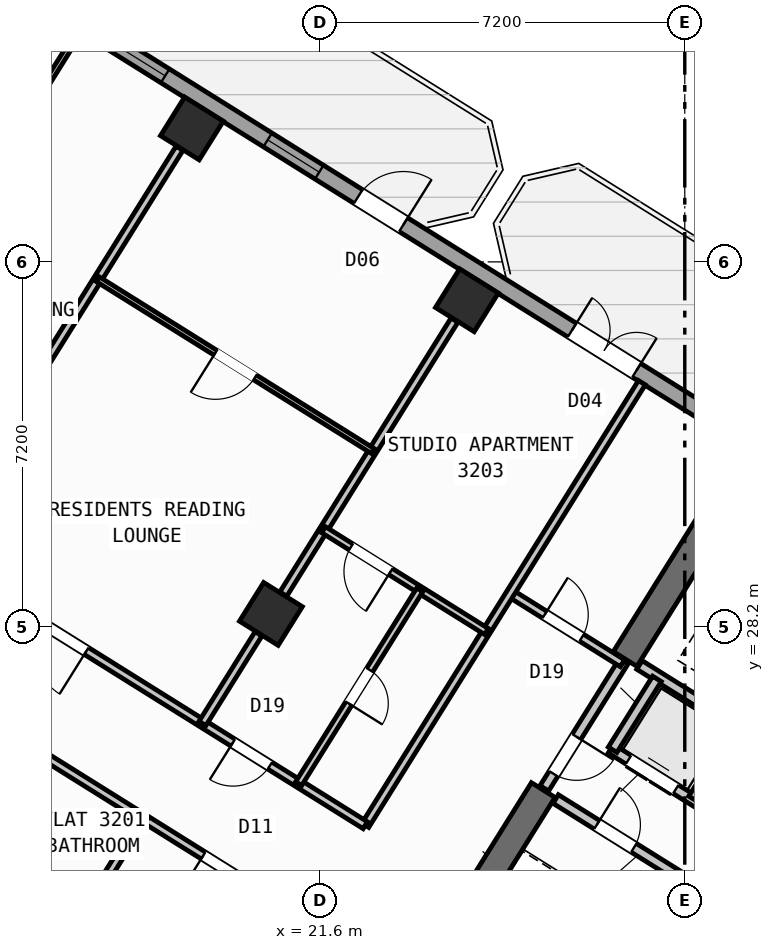
"""IFC4 building model, lengths in metres.
Left out: names, types, materials, properties, quantities, classifications, styles, units other than length and angle.
Written with IfcOpenShell. Run it as: python <this file> out.ifc"""

import sys

from ifc_helpers import new_model, si_unit, direction, frame, frame_2d, origin, origin_2d, place, context, subcontext, project, spatial, rectangle, hollow_rectangle, extrude, source, transform, mapped, element, fill, save


model = new_model("IFC4")
c1 = context("Model", 3, precision=1e-05, world=origin(), true_north=direction((0.0, 1.0)))
c2 = subcontext(c1, "Body", "Model", "MODEL_VIEW")
j1 = project(units=[si_unit("LENGTHUNIT", "METRE"), si_unit("PLANEANGLEUNIT", "RADIAN")], contexts=[c1])
p1 = place(None, origin())
s1 = spatial("IfcSite", under=j1, at=p1, CompositionType="ELEMENT")
p2 = place(p1, origin())
s2 = spatial("IfcBuilding", under=s1, at=p2, CompositionType="ELEMENT")
p3 = place(p2, frame((0.0, 0.0, 127.8)))
s3 = spatial("IfcBuildingStorey", under=s2, at=p3, CompositionType="ELEMENT", Elevation=127.8)
p4 = place(p3, frame((29.517, 30.594, 0.0), z_axis=(0.0, 0.0, 1.0), x_axis=(-0.529906864564, -0.848055844204, 0.0)))
e1 = element("IfcWall", 1, at=p4, inside=s3, PredefinedType="SHEAR", context=c2, shape_type="SweptSolid", body=[
    extrude(rectangle(XDim=3.575, YDim=0.55, at=frame_2d((1.788, 0.0))), origin(), (0.0, 0.0, 1.0), 4.55),
])
p5 = place(p3, frame((26.007, 24.976, 0.0), z_axis=(0.0, 0.0, 1.0), x_axis=(-0.529923795287, -0.848045264823, 0.0)))
e2 = element("IfcWall", 2, at=p5, inside=s3, PredefinedType="SHEAR", context=c2, shape_type="SweptSolid", body=[
    extrude(rectangle(XDim=6.425, YDim=0.55, at=frame_2d((3.212, 0.0))), origin(), (0.0, 0.0, 1.0), 4.55),
])
m1 = source(origin(), c2, "Body", "SweptSolid", [
    extrude(hollow_rectangle(XDim=0.9, YDim=0.9, WallThickness=0.036, at=origin_2d()), origin(), (0.0, 0.0, 1.0), 4.8),
])
for number, where, z_axis, x_axis in (
    (3, (24.5, 34.643, 0.0), (0.0, 0.0, 1.0), (-0.848, 0.53, 0.0)),
    (4, (20.632, 28.452, 0.0), (0.0, 0.0, 1.0), (-0.848, 0.53, 0.0)),
    (5, (19.073, 38.034, 0.0), (0.0, 0.0, 1.0), (-0.848, 0.53, 0.0)),
):
    element("IfcColumn", number, at=place(p3, frame(where, z_axis=z_axis, x_axis=x_axis)), inside=s3, PredefinedType="COLUMN", context=c2, shape_type="MappedRepresentation", body=[
        mapped(m1, transform((0.0, 0.0, 0.0), scale=1.0)),
    ])
p6 = place(p3, frame((14.138, 41.825, 0.0), z_axis=(0.0, 0.0, 1.0), x_axis=(0.848046498049, -0.529921821731, 0.0)))
e6 = element("IfcWall", 6, at=p6, inside=s3, PredefinedType="STANDARD", context=c2, shape_type="SweptSolid", body=[
    extrude(rectangle(XDim=31.588, YDim=0.32, at=frame_2d((15.794, 0.0))), origin(), (0.0, 0.0, 1.0), 4.55),
])
p7 = place(p6, frame((9.69, 0.0, 0.0)))
e7 = element("IfcOpeningElement", 7, at=p7, cuts=e6, PredefinedType="OPENING", context=c2, shape_type="SweptSolid", body=[
    extrude(rectangle(XDim=1.05, YDim=2.15, at=frame_2d((0.525, 1.075))), frame((0.0, 0.17, 0.0), z_axis=(0.0, -1.0, 0.0), x_axis=(1.0, 0.0, 0.0)), (0.0, 0.0, 1.0), 0.34),
])
p8 = place(p6, frame((14.666, 0.0, 0.0)))
e8 = element("IfcOpeningElement", 8, at=p8, cuts=e6, PredefinedType="OPENING", context=c2, shape_type="SweptSolid", body=[
    extrude(rectangle(XDim=1.5, YDim=2.25, at=frame_2d((0.75, 1.125))), frame((0.0, 0.17, 0.0), z_axis=(0.0, -1.0, 0.0), x_axis=(1.0, 0.0, 0.0)), (0.0, 0.0, 1.0), 0.34),
])
p9 = place(p6, frame((0.791, 0.0, 0.85)))
e9 = element("IfcOpeningElement", 9, at=p9, cuts=e6, PredefinedType="OPENING", context=c2, shape_type="SweptSolid", body=[
    extrude(rectangle(XDim=1.8, YDim=1.5, at=frame_2d((0.9, 0.75))), frame((0.0, 0.17, 0.0), z_axis=(0.0, -1.0, 0.0), x_axis=(1.0, 0.0, 0.0)), (0.0, 0.0, 1.0), 0.34),
])
p10 = place(p6, frame((3.996, 0.0, 0.95)))
e10 = element("IfcOpeningElement", 10, at=p10, cuts=e6, PredefinedType="OPENING", context=c2, shape_type="SweptSolid", body=[
    extrude(rectangle(XDim=1.2, YDim=1.4, at=frame_2d((0.6, 0.7))), frame((0.0, 0.17, 0.0), z_axis=(0.0, -1.0, 0.0), x_axis=(1.0, 0.0, 0.0)), (0.0, 0.0, 1.0), 0.34),
])
p11 = place(p6, frame((7.582, 0.0, 0.95)))
e11 = element("IfcOpeningElement", 11, at=p11, cuts=e6, PredefinedType="OPENING", context=c2, shape_type="SweptSolid", body=[
    extrude(rectangle(XDim=1.2, YDim=1.4, at=frame_2d((0.6, 0.7))), frame((0.0, 0.17, 0.0), z_axis=(0.0, -1.0, 0.0), x_axis=(1.0, 0.0, 0.0)), (0.0, 0.0, 1.0), 0.34),
])
p12 = place(p6, frame((21.381, 0.0, 0.75)))
e12 = element("IfcOpeningElement", 12, at=p12, cuts=e6, PredefinedType="OPENING", context=c2, shape_type="SweptSolid", body=[
    extrude(rectangle(XDim=2.4, YDim=1.6, at=frame_2d((1.2, 0.8))), frame((0.0, 0.17, 0.0), z_axis=(0.0, -1.0, 0.0), x_axis=(1.0, 0.0, 0.0)), (0.0, 0.0, 1.0), 0.34),
])
p13 = place(p6, frame((26.956, 0.0, 0.75)))
e13 = element("IfcOpeningElement", 13, at=p13, cuts=e6, PredefinedType="OPENING", context=c2, shape_type="SweptSolid", body=[
    extrude(rectangle(XDim=2.4, YDim=1.6, at=frame_2d((1.2, 0.8))), frame((0.0, 0.17, 0.0), z_axis=(0.0, -1.0, 0.0), x_axis=(1.0, 0.0, 0.0)), (0.0, 0.0, 1.0), 0.34),
])
p14 = place(p3, frame((31.822, 24.998, 0.0), z_axis=(0.0, 0.0, 1.0), x_axis=(-0.848036912365, 0.52993716162, 0.0)))
e14 = element("IfcWall", 14, at=p14, inside=s3, PredefinedType="STANDARD", context=c2, shape_type="SweptSolid", body=[
    extrude(rectangle(XDim=4.618, YDim=0.2, at=frame_2d((2.309, 0.0))), origin(), (0.0, 0.0, 1.0), 4.54),
])
p15 = place(p3, frame((32.108, 22.814, 0.0), z_axis=(0.0, 0.0, 1.0), x_axis=(-0.848042229521, 0.529928652696, 0.0)))
e15 = element("IfcWall", 15, at=p15, inside=s3, PredefinedType="STANDARD", context=c2, shape_type="SweptSolid", body=[
    extrude(rectangle(XDim=5.62, YDim=0.2, at=frame_2d((2.81, 0.0))), origin(), (0.0, 0.0, 1.0), 4.54),
])
p16 = place(p15, frame((0.39, 0.0, 0.0)))
e16 = element("IfcOpeningElement", 16, at=p16, cuts=e15, PredefinedType="OPENING", context=c2, shape_type="SweptSolid", body=[
    extrude(rectangle(XDim=1.1, YDim=2.15, at=frame_2d((0.55, 1.075))), frame((0.0, 0.11, 0.0), z_axis=(0.0, -1.0, 0.0), x_axis=(1.0, 0.0, 0.0)), (0.0, 0.0, 1.0), 0.22),
])
p17 = place(p15, frame((2.25, 0.0, 0.0)))
e17 = element("IfcOpeningElement", 17, at=p17, cuts=e15, PredefinedType="OPENING", context=c2, shape_type="SweptSolid", body=[
    extrude(rectangle(XDim=1.1, YDim=2.15, at=frame_2d((0.55, 1.075))), frame((0.0, 0.11, 0.0), z_axis=(0.0, -1.0, 0.0), x_axis=(1.0, 0.0, 0.0)), (0.0, 0.0, 1.0), 0.22),
])
p18 = place(p15, frame((4.11, 0.0, 0.0)))
e18 = element("IfcOpeningElement", 18, at=p18, cuts=e15, PredefinedType="OPENING", context=c2, shape_type="SweptSolid", body=[
    extrude(rectangle(XDim=1.1, YDim=2.15, at=frame_2d((0.55, 1.075))), frame((0.0, 0.11, 0.0), z_axis=(0.0, -1.0, 0.0), x_axis=(1.0, 0.0, 0.0)), (0.0, 0.0, 1.0), 0.22),
])
p19 = place(p3, frame((28.25, 27.17, 0.0), z_axis=(0.0, 0.0, 1.0), x_axis=(-0.529905827651, -0.848056492117, 0.0)))
e19 = element("IfcWall", 19, at=p19, inside=s3, PredefinedType="STANDARD", context=c2, shape_type="SweptSolid", body=[
    extrude(rectangle(XDim=1.65, YDim=0.2, at=frame_2d((0.825, 0.0))), origin(), (0.0, 0.0, 1.0), 4.54),
])
p20 = place(p3, frame((29.801, 26.142, 0.0), z_axis=(0.0, 0.0, 1.0), x_axis=(-0.529998940003, -0.847998304005, 0.0)))
e20 = element("IfcWall", 20, at=p20, inside=s3, PredefinedType="STANDARD", context=c2, shape_type="SweptSolid", body=[
    extrude(rectangle(XDim=1.58, YDim=0.2, at=frame_2d((0.79, 0.0))), origin(), (0.0, 0.0, 1.0), 4.54),
])
p21 = place(p3, frame((31.525, 21.504, 0.0), z_axis=(0.0, 0.0, 1.0), x_axis=(-0.848040211232, 0.529931882541, 0.0)))
e21 = element("IfcWall", 21, at=p21, inside=s3, PredefinedType="STANDARD", context=c2, shape_type="SweptSolid", body=[
    extrude(rectangle(XDim=6.218, YDim=0.2, at=frame_2d((3.109, 0.0))), origin(), (0.0, 0.0, 1.0), 4.54),
])
p22 = place(p21, frame((4.4, 0.0, 0.0)))
e22 = element("IfcOpeningElement", 22, at=p22, cuts=e21, PredefinedType="OPENING", context=c2, shape_type="SweptSolid", body=[
    extrude(rectangle(XDim=0.86, YDim=2.05, at=frame_2d((0.43, 1.025))), frame((0.0, 0.11, 0.0), z_axis=(0.0, -1.0, 0.0), x_axis=(1.0, 0.0, 0.0)), (0.0, 0.0, 1.0), 0.22),
])
p23 = place(p21, frame((1.45, 0.0, 0.0)))
e23 = element("IfcOpeningElement", 23, at=p23, cuts=e21, PredefinedType="OPENING", context=c2, shape_type="SweptSolid", body=[
    extrude(rectangle(XDim=0.86, YDim=2.05, at=frame_2d((0.43, 1.025))), frame((0.0, 0.11, 0.0), z_axis=(0.0, -1.0, 0.0), x_axis=(1.0, 0.0, 0.0)), (0.0, 0.0, 1.0), 0.22),
])
p24 = place(p3, frame((27.596, 27.52, 0.0), z_axis=(0.0, 0.0, 1.0), x_axis=(-0.529865479138, -0.848081702443, 0.0)))
e24 = element("IfcWall", 24, at=p24, inside=s3, PredefinedType="STANDARD", context=c2, shape_type="SweptSolid", body=[
    extrude(rectangle(XDim=2.96, YDim=0.2, at=frame_2d((1.48, 0.0))), origin(), (0.0, 0.0, 1.0), 4.54),
])
p25 = place(p24, frame((1.76, 0.0, 0.0)))
e25 = element("IfcOpeningElement", 25, at=p25, cuts=e24, PredefinedType="OPENING", context=c2, shape_type="SweptSolid", body=[
    extrude(rectangle(XDim=0.86, YDim=2.05, at=frame_2d((0.43, 1.025))), frame((0.0, 0.11, 0.0), z_axis=(0.0, -1.0, 0.0), x_axis=(1.0, 0.0, 0.0)), (0.0, 0.0, 1.0), 0.22),
])
p26 = place(p3, frame((27.57, 27.478, 0.0), z_axis=(0.0, 0.0, 1.0), x_axis=(-0.848050851465, 0.529914854792, 0.0)))
e26 = element("IfcWall", 26, at=p26, inside=s3, PredefinedType="PARTITIONING", context=c2, shape_type="SweptSolid", body=[
    extrude(rectangle(XDim=2.61, YDim=0.16, at=frame_2d((1.305, 0.0))), origin(), (0.0, 0.0, 1.0), 4.54),
])
p27 = place(p26, frame((0.95, 0.0, 0.0)))
e27 = element("IfcOpeningElement", 27, at=p27, cuts=e26, PredefinedType="OPENING", context=c2, shape_type="SweptSolid", body=[
    extrude(rectangle(XDim=0.86, YDim=2.05, at=frame_2d((0.43, 1.025))), frame((0.0, 0.09, 0.0), z_axis=(0.0, -1.0, 0.0), x_axis=(1.0, 0.0, 0.0)), (0.0, 0.0, 1.0), 0.18),
])
p28 = place(p3, frame((27.953, 33.016, 0.0), z_axis=(0.0, 0.0, 1.0), x_axis=(-0.529909450694, -0.848054228257, 0.0)))
e28 = element("IfcWall", 28, at=p28, inside=s3, PredefinedType="PARTITIONING", context=c2, shape_type="SweptSolid", body=[
    extrude(rectangle(XDim=10.3, YDim=0.16, at=frame_2d((5.15, 0.0))), origin(), (0.0, 0.0, 1.0), 4.54),
])
p29 = place(p3, frame((22.495, 24.281, 0.0), z_axis=(0.0, 0.0, 1.0), x_axis=(-0.848052408131, 0.529912363569, 0.0)))
e29 = element("IfcWall", 29, at=p29, inside=s3, PredefinedType="PARTITIONING", context=c2, shape_type="SweptSolid", body=[
    extrude(rectangle(XDim=16.73, YDim=0.16, at=frame_2d((8.365, 0.0))), origin(), (0.0, 0.0, 1.0), 4.54),
])
p30 = place(p29, frame((2.22, 0.0, 0.0)))
e30 = element("IfcOpeningElement", 30, at=p30, cuts=e29, PredefinedType="OPENING", context=c2, shape_type="SweptSolid", body=[
    extrude(rectangle(XDim=0.86, YDim=2.05, at=frame_2d((0.43, 1.025))), frame((0.0, 0.09, 0.0), z_axis=(0.0, -1.0, 0.0), x_axis=(1.0, 0.0, 0.0)), (0.0, 0.0, 1.0), 0.18),
])
p31 = place(p29, frame((6.49, 0.0, 0.0)))
e31 = element("IfcOpeningElement", 31, at=p31, cuts=e29, PredefinedType="OPENING", context=c2, shape_type="SweptSolid", body=[
    extrude(rectangle(XDim=1.0, YDim=2.1, at=frame_2d((0.5, 1.05))), frame((0.0, 0.09, 0.0), z_axis=(0.0, -1.0, 0.0), x_axis=(1.0, 0.0, 0.0)), (0.0, 0.0, 1.0), 0.18),
])
p32 = place(p29, frame((11.14, 0.0, 0.0)))
e32 = element("IfcOpeningElement", 32, at=p32, cuts=e29, PredefinedType="OPENING", context=c2, shape_type="SweptSolid", body=[
    extrude(rectangle(XDim=1.0, YDim=2.1, at=frame_2d((0.5, 1.05))), frame((0.0, 0.09, 0.0), z_axis=(0.0, -1.0, 0.0), x_axis=(1.0, 0.0, 0.0)), (0.0, 0.0, 1.0), 0.18),
])
p33 = place(p3, frame((21.329, 22.416, 0.0), z_axis=(0.0, 0.0, 1.0), x_axis=(-0.848052408131, 0.529912363569, 0.0)))
e33 = element("IfcWall", 33, at=p33, inside=s3, PredefinedType="PARTITIONING", context=c2, shape_type="SweptSolid", body=[
    extrude(rectangle(XDim=16.73, YDim=0.16, at=frame_2d((8.365, 0.0))), origin(), (0.0, 0.0, 1.0), 4.54),
])
p34 = place(p33, frame((1.395, 0.0, 0.0)))
e34 = element("IfcOpeningElement", 34, at=p34, cuts=e33, PredefinedType="OPENING", context=c2, shape_type="SweptSolid", body=[
    extrude(rectangle(XDim=1.0, YDim=2.1, at=frame_2d((0.5, 1.05))), frame((0.0, 0.09, 0.0), z_axis=(0.0, -1.0, 0.0), x_axis=(1.0, 0.0, 0.0)), (0.0, 0.0, 1.0), 0.18),
])
p35 = place(p33, frame((7.82, 0.0, 0.0)))
e35 = element("IfcOpeningElement", 35, at=p35, cuts=e33, PredefinedType="OPENING", context=c2, shape_type="SweptSolid", body=[
    extrude(rectangle(XDim=1.0, YDim=2.1, at=frame_2d((0.5, 1.05))), frame((0.0, 0.09, 0.0), z_axis=(0.0, -1.0, 0.0), x_axis=(1.0, 0.0, 0.0)), (0.0, 0.0, 1.0), 0.18),
])
p36 = place(p33, frame((14.76, 0.0, 0.0)))
e36 = element("IfcOpeningElement", 36, at=p36, cuts=e33, PredefinedType="OPENING", context=c2, shape_type="SweptSolid", body=[
    extrude(rectangle(XDim=1.0, YDim=2.1, at=frame_2d((0.5, 1.05))), frame((0.0, 0.09, 0.0), z_axis=(0.0, -1.0, 0.0), x_axis=(1.0, 0.0, 0.0)), (0.0, 0.0, 1.0), 0.18),
])
p37 = place(p3, frame((18.115, 24.424, 0.0), z_axis=(0.0, 0.0, 1.0), x_axis=(-0.529904345651, -0.848057418139, 0.0)))
e37 = element("IfcWall", 37, at=p37, inside=s3, PredefinedType="PARTITIONING", context=c2, shape_type="SweptSolid", body=[
    extrude(rectangle(XDim=2.088, YDim=0.16, at=frame_2d((1.044, 0.0))), origin(), (0.0, 0.0, 1.0), 3.975),
])
p38 = place(p3, frame((24.256, 34.251, 0.0), z_axis=(0.0, 0.0, 1.0), x_axis=(-0.529919772691, -0.848047778437, 0.0)))
e38 = element("IfcWall", 38, at=p38, inside=s3, PredefinedType="PARTITIONING", context=c2, shape_type="SweptSolid", body=[
    extrude(rectangle(XDim=6.376, YDim=0.16, at=frame_2d((3.188, 0.0))), origin(), (0.0, 0.0, 1.0), 3.975),
])
p39 = place(p3, frame((20.387, 28.06, 0.0), z_axis=(0.0, 0.0, 1.0), x_axis=(-0.529904345651, -0.848057418139, 0.0)))
e39 = element("IfcWall", 39, at=p39, inside=s3, PredefinedType="PARTITIONING", context=c2, shape_type="SweptSolid", body=[
    extrude(rectangle(XDim=2.088, YDim=0.16, at=frame_2d((1.044, 0.0))), origin(), (0.0, 0.0, 1.0), 3.975),
])
p40 = place(p3, frame((24.885, 28.106, 0.0), z_axis=(0.0, 0.0, 1.0), x_axis=(-0.848059820872, 0.529900500304, 0.0)))
e40 = element("IfcWall", 40, at=p40, inside=s3, PredefinedType="PLUMBINGWALL", context=c2, shape_type="SweptSolid", body=[
    extrude(rectangle(XDim=3.79, YDim=0.14, at=frame_2d((1.895, 0.0))), origin(), (0.0, 0.0, 1.0), 4.54),
])
p41 = place(p40, frame((2.23, 0.0, 0.0)))
e41 = element("IfcOpeningElement", 41, at=p41, cuts=e40, PredefinedType="OPENING", context=c2, shape_type="SweptSolid", body=[
    extrude(rectangle(XDim=0.92, YDim=2.08, at=frame_2d((0.46, 1.04))), frame((0.0, 0.08, 0.0), z_axis=(0.0, -1.0, 0.0), x_axis=(1.0, 0.0, 0.0)), (0.0, 0.0, 1.0), 0.16),
])
p42 = place(p3, frame((23.57, 28.927, 0.0), z_axis=(0.0, 0.0, 1.0), x_axis=(-0.529911350634, -0.84805304107, 0.0)))
e42 = element("IfcWall", 42, at=p42, inside=s3, PredefinedType="PLUMBINGWALL", context=c2, shape_type="SweptSolid", body=[
    extrude(rectangle(XDim=4.51, YDim=0.14, at=frame_2d((2.255, 0.0))), origin(), (0.0, 0.0, 1.0), 4.195),
])
p43 = place(p42, frame((1.865, 0.0, 0.0)))
e43 = element("IfcOpeningElement", 43, at=p43, cuts=e42, PredefinedType="OPENING", context=c2, shape_type="SweptSolid", body=[
    extrude(rectangle(XDim=0.78, YDim=2.05, at=frame_2d((0.39, 1.025))), frame((0.0, 0.08, 0.0), z_axis=(0.0, -1.0, 0.0), x_axis=(1.0, 0.0, 0.0)), (0.0, 0.0, 1.0), 0.16),
])
p44 = place(p3, frame((18.828, 37.643, 0.0), z_axis=(0.0, 0.0, 1.0), x_axis=(-0.529930102756, -0.848041323399, 0.0)))
e44 = element("IfcWall", 44, at=p44, inside=s3, PredefinedType="PARTITIONING", context=c2, shape_type="SweptSolid", body=[
    extrude(rectangle(XDim=6.376, YDim=0.16, at=frame_2d((3.188, 0.0))), origin(), (0.0, 0.0, 1.0), 3.975),
])
p45 = place(p3, frame((22.642, 31.668, 0.0), z_axis=(0.0, 0.0, 1.0), x_axis=(-0.84806687439, 0.529889211593, 0.0)))
e45 = element("IfcWall", 45, at=p45, inside=s3, PredefinedType="PARTITIONING", context=c2, shape_type="SweptSolid", body=[
    extrude(rectangle(XDim=6.4, YDim=0.11, at=frame_2d((3.2, 0.0))), origin(), (0.0, 0.0, 1.0), 4.54),
])
p46 = place(p45, frame((2.74, 0.0, 0.0)))
e46 = element("IfcOpeningElement", 46, at=p46, cuts=e45, PredefinedType="OPENING", context=c2, shape_type="SweptSolid", body=[
    extrude(rectangle(XDim=0.92, YDim=2.08, at=frame_2d((0.46, 1.04))), frame((0.0, 0.065, 0.0), z_axis=(0.0, -1.0, 0.0), x_axis=(1.0, 0.0, 0.0)), (0.0, 0.0, 1.0), 0.13),
])
p47 = place(p3, frame((16.995, 40.182, 0.0), z_axis=(0.0, 0.0, 1.0), x_axis=(-0.529924195719, -0.848045014602, 0.0)))
e47 = element("IfcWall", 47, at=p47, inside=s3, PredefinedType="PARTITIONING", context=c2, shape_type="SweptSolid", body=[
    extrude(rectangle(XDim=10.57, YDim=0.11, at=frame_2d((5.285, 0.0))), origin(), (0.0, 0.0, 1.0), 4.54),
])
p48 = place(p47, frame((8.93, 0.0, 0.0)))
e48 = element("IfcOpeningElement", 48, at=p48, cuts=e47, PredefinedType="OPENING", context=c2, shape_type="SweptSolid", body=[
    extrude(rectangle(XDim=0.78, YDim=2.05, at=frame_2d((0.39, 1.025))), frame((0.0, 0.065, 0.0), z_axis=(0.0, -1.0, 0.0), x_axis=(1.0, 0.0, 0.0)), (0.0, 0.0, 1.0), 0.13),
])
p49 = place(p47, frame((3.625, 0.0, 0.0)))
e49 = element("IfcOpeningElement", 49, at=p49, cuts=e47, PredefinedType="OPENING", context=c2, shape_type="SweptSolid", body=[
    extrude(rectangle(XDim=0.92, YDim=2.08, at=frame_2d((0.46, 1.04))), frame((0.0, 0.065, 0.0), z_axis=(0.0, -1.0, 0.0), x_axis=(1.0, 0.0, 0.0)), (0.0, 0.0, 1.0), 0.13),
])
m2 = source(origin(), c2, "Body", "SweptSolid", [
    extrude(rectangle(XDim=1.05, YDim=2.15, at=frame_2d((0.525, 1.075))), frame((0.0, 0.025, 0.0), z_axis=(0.0, -1.0, 0.0), x_axis=(1.0, 0.0, 0.0)), (0.0, 0.0, 1.0), 0.05),
])
p50 = place(p7, origin())
e50 = element("IfcDoor", 50, at=p50, inside=s3, OperationType="SINGLE_SWING_RIGHT", PredefinedType="DOOR", context=c2, shape_type="MappedRepresentation", body=[
    mapped(m2, transform((0.0, 0.0, 0.0), scale=1.0)),
])
fill(e7, e50)
m3 = source(origin(), c2, "Body", "SweptSolid", [
    extrude(rectangle(XDim=1.5, YDim=2.25, at=frame_2d((0.75, 1.125))), frame((0.0, 0.025, 0.0), z_axis=(0.0, -1.0, 0.0), x_axis=(1.0, 0.0, 0.0)), (0.0, 0.0, 1.0), 0.05),
])
p51 = place(p8, origin())
e51 = element("IfcDoor", 51, at=p51, inside=s3, OperationType="DOUBLE_DOOR_SINGLE_SWING", PredefinedType="DOOR", context=c2, shape_type="MappedRepresentation", body=[
    mapped(m3, transform((0.0, 0.0, 0.0), scale=1.0)),
])
fill(e8, e51)
m4 = source(origin(), c2, "Body", "SweptSolid", [
    extrude(rectangle(XDim=1.2, YDim=1.4, at=frame_2d((0.6, 0.7))), frame((0.0, 0.03, 0.0), z_axis=(0.0, -1.0, 0.0), x_axis=(1.0, 0.0, 0.0)), (0.0, 0.0, 1.0), 0.06),
])
p52 = place(p10, origin())
e52 = element("IfcWindow", 52, at=p52, inside=s3, PartitioningType="SINGLE_PANEL", PredefinedType="WINDOW", context=c2, shape_type="MappedRepresentation", body=[
    mapped(m4, transform((0.0, 0.0, 0.0), scale=1.0)),
])
fill(e10, e52)
p53 = place(p11, origin())
e53 = element("IfcWindow", 53, at=p53, inside=s3, PartitioningType="SINGLE_PANEL", PredefinedType="WINDOW", context=c2, shape_type="MappedRepresentation", body=[
    mapped(m4, transform((0.0, 0.0, 0.0), scale=1.0)),
])
fill(e11, e53)
m5 = source(origin(), c2, "Body", "SweptSolid", [
    extrude(rectangle(XDim=1.1, YDim=2.15, at=frame_2d((0.55, 1.075))), frame((0.0, 0.025, 0.0), z_axis=(0.0, -1.0, 0.0), x_axis=(1.0, 0.0, 0.0)), (0.0, 0.0, 1.0), 0.05),
])
p54 = place(p18, origin())
e54 = element("IfcDoor", 54, at=p54, inside=s3, OperationType="DOUBLE_DOOR_SLIDING", PredefinedType="DOOR", context=c2, shape_type="MappedRepresentation", body=[
    mapped(m5, transform((0.0, 0.0, 0.0), scale=1.0)),
])
fill(e18, e54)
m6 = source(origin(), c2, "Body", "SweptSolid", [
    extrude(rectangle(XDim=0.86, YDim=2.05, at=frame_2d((0.43, 1.025))), frame((0.0, 0.025, 0.0), z_axis=(0.0, -1.0, 0.0), x_axis=(1.0, 0.0, 0.0)), (0.0, 0.0, 1.0), 0.05),
])
p55 = place(p22, frame((0.86, 0.0, 0.0), z_axis=(0.0, 0.0, 1.0), x_axis=(-1.0, 0.0, 0.0)))
e55 = element("IfcDoor", 55, at=p55, inside=s3, OperationType="SINGLE_SWING_LEFT", PredefinedType="DOOR", context=c2, shape_type="MappedRepresentation", body=[
    mapped(m6, transform((0.0, 0.0, 0.0), scale=1.0)),
])
fill(e22, e55)
p56 = place(p27, frame((0.86, 0.0, 0.0), z_axis=(0.0, 0.0, 1.0), x_axis=(-1.0, 0.0, 0.0)))
e56 = element("IfcDoor", 56, at=p56, inside=s3, OperationType="SINGLE_SWING_LEFT", PredefinedType="DOOR", context=c2, shape_type="MappedRepresentation", body=[
    mapped(m6, transform((0.0, 0.0, 0.0), scale=1.0)),
])
fill(e27, e56)
p57 = place(p25, origin())
e57 = element("IfcDoor", 57, at=p57, inside=s3, OperationType="SINGLE_SWING_LEFT", PredefinedType="DOOR", context=c2, shape_type="MappedRepresentation", body=[
    mapped(m6, transform((0.0, 0.0, 0.0), scale=1.0)),
])
fill(e25, e57)
m7 = source(origin(), c2, "Body", "SweptSolid", [
    extrude(rectangle(XDim=1.0, YDim=2.1, at=frame_2d((0.5, 1.05))), frame((0.0, 0.025, 0.0), z_axis=(0.0, -1.0, 0.0), x_axis=(1.0, 0.0, 0.0)), (0.0, 0.0, 1.0), 0.05),
])
p58 = place(p34, origin())
e58 = element("IfcDoor", 58, at=p58, inside=s3, OperationType="SINGLE_SWING_RIGHT", PredefinedType="DOOR", context=c2, shape_type="MappedRepresentation", body=[
    mapped(m7, transform((0.0, 0.0, 0.0), scale=1.0)),
])
fill(e34, e58)
p59 = place(p30, origin())
e59 = element("IfcDoor", 59, at=p59, inside=s3, OperationType="SINGLE_SWING_RIGHT", PredefinedType="DOOR", context=c2, shape_type="MappedRepresentation", body=[
    mapped(m6, transform((0.0, 0.0, 0.0), scale=1.0)),
])
fill(e30, e59)
m8 = source(origin(), c2, "Body", "SweptSolid", [
    extrude(rectangle(XDim=0.92, YDim=2.08, at=frame_2d((0.46, 1.04))), frame((0.0, 0.025, 0.0), z_axis=(0.0, -1.0, 0.0), x_axis=(1.0, 0.0, 0.0)), (0.0, 0.0, 1.0), 0.05),
])
p60 = place(p41, origin())
e60 = element("IfcDoor", 60, at=p60, inside=s3, OperationType="SINGLE_SWING_LEFT", PredefinedType="DOOR", context=c2, shape_type="MappedRepresentation", body=[
    mapped(m8, transform((0.0, 0.0, 0.0), scale=1.0)),
])
fill(e41, e60)
m9 = source(origin(), c2, "Body", "SweptSolid", [
    extrude(rectangle(XDim=0.78, YDim=2.05, at=frame_2d((0.39, 1.025))), frame((0.0, 0.025, 0.0), z_axis=(0.0, -1.0, 0.0), x_axis=(1.0, 0.0, 0.0)), (0.0, 0.0, 1.0), 0.05),
])
p61 = place(p43, origin())
e61 = element("IfcDoor", 61, at=p61, inside=s3, OperationType="SINGLE_SWING_RIGHT", PredefinedType="DOOR", context=c2, shape_type="MappedRepresentation", body=[
    mapped(m9, transform((0.0, 0.0, 0.0), scale=1.0)),
])
fill(e43, e61)
p62 = place(p31, origin())
e62 = element("IfcDoor", 62, at=p62, inside=s3, OperationType="SINGLE_SWING_LEFT", PredefinedType="DOOR", context=c2, shape_type="MappedRepresentation", body=[
    mapped(m7, transform((0.0, 0.0, 0.0), scale=1.0)),
])
fill(e31, e62)
p63 = place(p46, origin())
e63 = element("IfcDoor", 63, at=p63, inside=s3, OperationType="SINGLE_SWING_RIGHT", PredefinedType="DOOR", context=c2, shape_type="MappedRepresentation", body=[
    mapped(m8, transform((0.0, 0.0, 0.0), scale=1.0)),
])
fill(e46, e63)
save(model, sys.argv[1])
